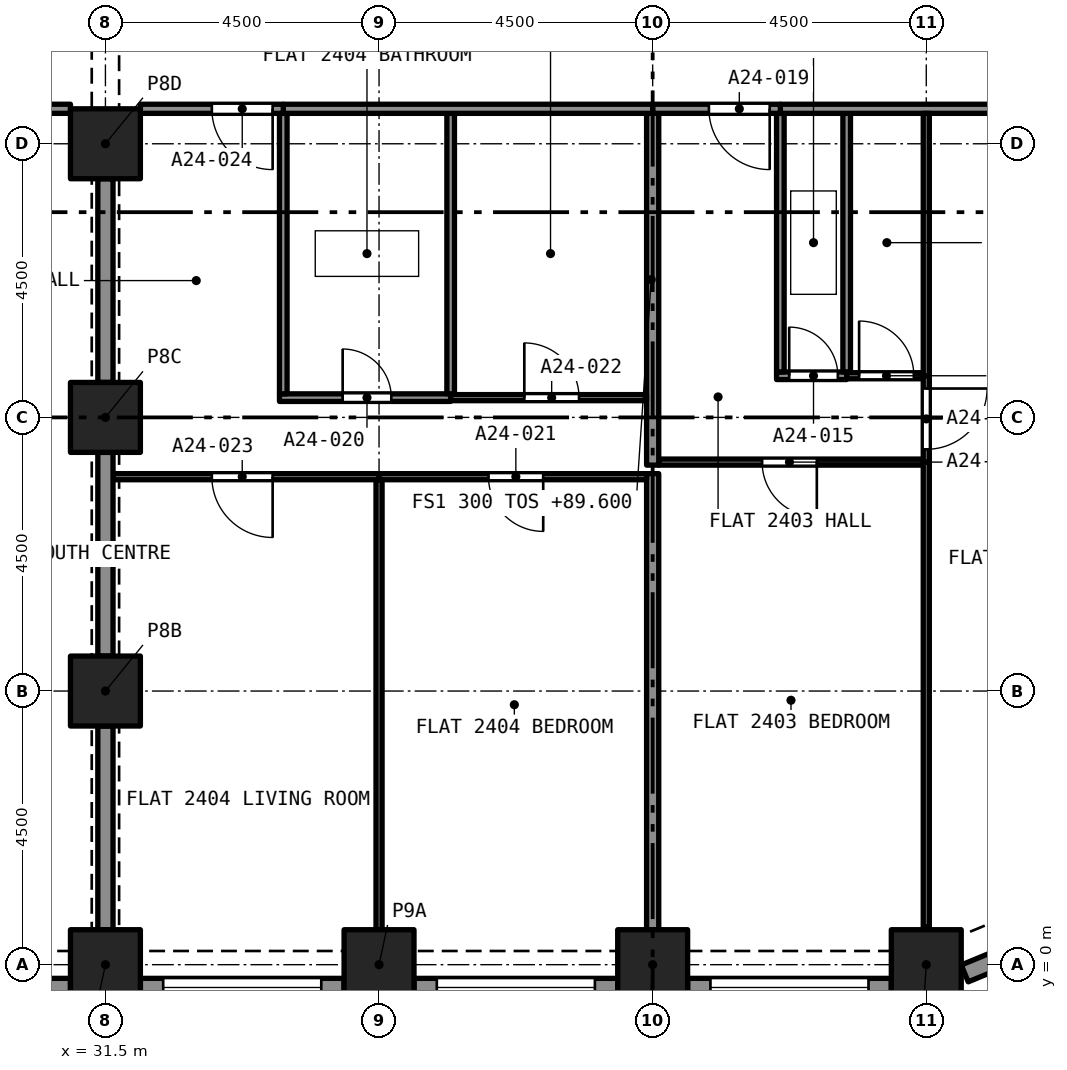
"""IFC4 building model, lengths in metres.
Left out: names, types, materials, properties, quantities, classifications, styles, units other than length and angle.
Written with IfcOpenShell. Run it as: python <this file> out.ifc"""

import sys

from ifc_helpers import new_model, si_unit, direction, frame, frame_2d, origin, origin_2d, place, context, subcontext, project, spatial, rectangle, extrude, element, fill, save


model = new_model("IFC4")
c1 = context("Model", 3, precision=1e-05, world=origin(), true_north=direction((0.0, 1.0)))
c2 = subcontext(c1, "Body", "Model", "MODEL_VIEW")
j1 = project(units=[si_unit("LENGTHUNIT", "METRE"), si_unit("PLANEANGLEUNIT", "RADIAN")], contexts=[c1])
p1 = place(None, origin())
s1 = spatial("IfcSite", under=j1, at=p1, CompositionType="ELEMENT")
p2 = place(p1, origin())
s2 = spatial("IfcBuilding", under=s1, at=p2, CompositionType="ELEMENT")
p3 = place(p2, frame((0.0, 0.0, 89.6)))
s3 = spatial("IfcBuildingStorey", under=s2, at=p3, CompositionType="ELEMENT", Elevation=89.6)
for number, where, z_axis, x_axis in (
    (1, (31.5, 0.0, 0.0), (0.0, 0.0, 1.0), (1.0, 0.0, 0.0)),
    (2, (36.0, 0.0, 0.0), (0.0, 0.0, 1.0), (1.0, 0.0, 0.0)),
    (3, (40.5, 0.0, 0.0), (0.0, 0.0, 1.0), (1.0, 0.0, 0.0)),
    (4, (45.0, 0.0, 0.0), (0.0, 0.0, 1.0), (1.0, 0.0, 0.0)),
    (5, (31.5, 4.5, 0.0), (0.0, 0.0, 1.0), (1.0, 0.0, 0.0)),
    (6, (31.5, 9.0, 0.0), (0.0, 0.0, 1.0), (1.0, 0.0, 0.0)),
    (7, (31.5, 13.5, 0.0), (0.0, 0.0, 1.0), (1.0, 0.0, 0.0)),
):
    element("IfcColumn", number, at=place(p3, frame(where, z_axis=z_axis, x_axis=x_axis)), inside=s3, PredefinedType="COLUMN", context=c2, shape_type="SweptSolid", body=[
        extrude(rectangle(XDim=1.15, YDim=1.15, at=origin_2d()), origin(), (0.0, 0.0, 1.0), 3.2),
    ])
p4 = place(p3, frame((30.925, -0.375, 0.0), z_axis=(0.0, 0.0, 1.0), x_axis=(-1.0, 0.0, 0.0)))
e8 = element("IfcWall", 8, at=p4, inside=s3, PredefinedType="SOLIDWALL", context=c2, shape_type="SweptSolid", body=[
    extrude(rectangle(XDim=3.35, YDim=0.3, at=frame_2d((1.675, 0.0))), origin(), (0.0, 0.0, 1.0), 3.2),
])
p5 = place(p4, frame((0.375, 0.0, 0.45)))
e9 = element("IfcOpeningElement", 9, at=p5, cuts=e8, PredefinedType="OPENING", context=c2, shape_type="SweptSolid", body=[
    extrude(rectangle(XDim=2.6, YDim=1.95, at=frame_2d((1.3, 0.975))), frame((0.0, 0.16, 0.0), z_axis=(0.0, -1.0, 0.0), x_axis=(1.0, 0.0, 0.0)), (0.0, 0.0, 1.0), 0.32),
])
p6 = place(p3, frame((35.425, -0.375, 0.0), z_axis=(0.0, 0.0, 1.0), x_axis=(-1.0, 0.0, 0.0)))
e10 = element("IfcWall", 10, at=p6, inside=s3, PredefinedType="SOLIDWALL", context=c2, shape_type="SweptSolid", body=[
    extrude(rectangle(XDim=3.35, YDim=0.3, at=frame_2d((1.675, 0.0))), origin(), (0.0, 0.0, 1.0), 3.2),
])
p7 = place(p6, frame((0.375, 0.0, 0.45)))
e11 = element("IfcOpeningElement", 11, at=p7, cuts=e10, PredefinedType="OPENING", context=c2, shape_type="SweptSolid", body=[
    extrude(rectangle(XDim=2.6, YDim=1.95, at=frame_2d((1.3, 0.975))), frame((0.0, 0.16, 0.0), z_axis=(0.0, -1.0, 0.0), x_axis=(1.0, 0.0, 0.0)), (0.0, 0.0, 1.0), 0.32),
])
p8 = place(p3, frame((39.925, -0.375, 0.0), z_axis=(0.0, 0.0, 1.0), x_axis=(-1.0, 0.0, 0.0)))
e12 = element("IfcWall", 12, at=p8, inside=s3, PredefinedType="SOLIDWALL", context=c2, shape_type="SweptSolid", body=[
    extrude(rectangle(XDim=3.35, YDim=0.3, at=frame_2d((1.675, 0.0))), origin(), (0.0, 0.0, 1.0), 3.2),
])
p9 = place(p8, frame((0.375, 0.0, 0.45)))
e13 = element("IfcOpeningElement", 13, at=p9, cuts=e12, PredefinedType="OPENING", context=c2, shape_type="SweptSolid", body=[
    extrude(rectangle(XDim=2.6, YDim=1.95, at=frame_2d((1.3, 0.975))), frame((0.0, 0.16, 0.0), z_axis=(0.0, -1.0, 0.0), x_axis=(1.0, 0.0, 0.0)), (0.0, 0.0, 1.0), 0.32),
])
p10 = place(p3, frame((44.425, -0.375, 0.0), z_axis=(0.0, 0.0, 1.0), x_axis=(-1.0, 0.0, 0.0)))
e14 = element("IfcWall", 14, at=p10, inside=s3, PredefinedType="SOLIDWALL", context=c2, shape_type="SweptSolid", body=[
    extrude(rectangle(XDim=3.35, YDim=0.3, at=frame_2d((1.675, 0.0))), origin(), (0.0, 0.0, 1.0), 3.2),
])
p11 = place(p10, frame((0.375, 0.0, 0.45)))
e15 = element("IfcOpeningElement", 15, at=p11, cuts=e14, PredefinedType="OPENING", context=c2, shape_type="SweptSolid", body=[
    extrude(rectangle(XDim=2.6, YDim=1.95, at=frame_2d((1.3, 0.975))), frame((0.0, 0.16, 0.0), z_axis=(0.0, -1.0, 0.0), x_axis=(1.0, 0.0, 0.0)), (0.0, 0.0, 1.0), 0.32),
])
p12 = place(p3, frame((47.631, 0.684, 0.0), z_axis=(0.0, 0.0, 1.0), x_axis=(-0.923862802911, -0.382723818695, 0.0)))
e16 = element("IfcWall", 16, at=p12, inside=s3, PredefinedType="SOLIDWALL", context=c2, shape_type="SweptSolid", body=[
    extrude(rectangle(XDim=2.164, YDim=0.3, at=frame_2d((1.082, 0.0))), origin(), (0.0, 0.0, 1.0), 3.2),
])
p13 = place(p12, frame((0.271, 0.0, 0.45)))
e17 = element("IfcOpeningElement", 17, at=p13, cuts=e16, PredefinedType="OPENING", context=c2, shape_type="SweptSolid", body=[
    extrude(rectangle(XDim=1.4, YDim=1.95, at=frame_2d((0.7, 0.975))), frame((0.0, 0.16, 0.0), z_axis=(0.0, -1.0, 0.0), x_axis=(1.0, 0.0, 0.0)), (0.0, 0.0, 1.0), 0.32),
])
p14 = place(p3, frame((42.538, 9.685, 0.0), z_axis=(0.0, 0.0, 1.0), x_axis=(1.0, 0.0, 0.0)))
e18 = element("IfcWall", 18, at=p14, inside=s3, PredefinedType="PARTITIONING", context=c2, shape_type="SweptSolid", body=[
    extrude(rectangle(XDim=1.153, YDim=0.125, at=frame_2d((0.577, 0.0))), origin(), (0.0, 0.0, 1.0), 2.9),
])
p15 = place(p14, frame((0.208, 0.0, 0.0)))
e19 = element("IfcOpeningElement", 19, at=p15, cuts=e18, PredefinedType="OPENING", context=c2, shape_type="SweptSolid", body=[
    extrude(rectangle(XDim=0.8, YDim=2.1, at=frame_2d((0.4, 1.05))), frame((0.0, 0.073, 0.0), z_axis=(0.0, -1.0, 0.0), x_axis=(1.0, 0.0, 0.0)), (0.0, 0.0, 1.0), 0.145),
])
for number, where, z_axis, x_axis in (
    (20, (42.6, 9.748, 0.0), (0.0, 0.0, 1.0), (0.0, 1.0, 0.0)),
    (21, (43.691, 9.748, 0.0), (0.0, 0.0, 1.0), (0.0, 1.0, 0.0)),
):
    element("IfcWall", number, at=place(p3, frame(where, z_axis=z_axis, x_axis=x_axis)), inside=s3, PredefinedType="PARTITIONING", context=c2, shape_type="SweptSolid", body=[
        extrude(rectangle(XDim=4.252, YDim=0.125, at=frame_2d((2.126, 0.0))), origin(), (0.0, 0.0, 1.0), 2.9),
    ])
p16 = place(p3, frame((42.6, 14.075, 0.0), z_axis=(0.0, 0.0, 1.0), x_axis=(1.0, 0.0, 0.0)))
e22 = element("IfcWall", 22, at=p16, inside=s3, PredefinedType="PARTITIONING", context=c2, shape_type="SweptSolid", body=[
    extrude(rectangle(XDim=6.325, YDim=0.15, at=frame_2d((3.163, 0.0))), origin(), (0.0, 0.0, 1.0), 2.9),
])
p17 = place(p3, frame((44.95, 8.265, 0.0), z_axis=(0.0, 0.0, 1.0), x_axis=(-1.0, 0.0, 0.0)))
e23 = element("IfcWall", 23, at=p17, inside=s3, PredefinedType="PARTITIONING", context=c2, shape_type="SweptSolid", body=[
    extrude(rectangle(XDim=4.35, YDim=0.1, at=frame_2d((2.175, 0.0))), origin(), (0.0, 0.0, 1.0), 2.9),
])
p18 = place(p17, frame((1.75, 0.0, 0.0)))
e24 = element("IfcOpeningElement", 24, at=p18, cuts=e23, PredefinedType="OPENING", context=c2, shape_type="SweptSolid", body=[
    extrude(rectangle(XDim=0.9, YDim=2.1, at=frame_2d((0.45, 1.05))), frame((0.0, 0.06, 0.0), z_axis=(0.0, -1.0, 0.0), x_axis=(1.0, 0.0, 0.0)), (0.0, 0.0, 1.0), 0.12),
])
p19 = place(p3, frame((45.0, 0.622, 0.0), z_axis=(0.0, 0.0, 1.0), x_axis=(0.0, 1.0, 0.0)))
e25 = element("IfcWall", 25, at=p19, inside=s3, PredefinedType="PARTITIONING", context=c2, shape_type="SweptSolid", body=[
    extrude(rectangle(XDim=7.643, YDim=0.1, at=frame_2d((3.821, 0.0))), origin(), (0.0, 0.0, 1.0), 2.9),
])
p20 = place(p3, frame((40.5, 0.575, 0.0), z_axis=(0.0, 0.0, 1.0), x_axis=(0.0, 1.0, 0.0)))
e26 = element("IfcWall", 26, at=p20, inside=s3, PredefinedType="PARTITIONING", context=c2, shape_type="SweptSolid", body=[
    extrude(rectangle(XDim=7.5, YDim=0.2, at=frame_2d((3.75, 0.0))), origin(), (0.0, 0.0, 1.0), 2.9),
])
p21 = place(p3, frame((43.691, 9.685, 0.0), z_axis=(0.0, 0.0, 1.0), x_axis=(1.0, 0.0, 0.0)))
e27 = element("IfcWall", 27, at=p21, inside=s3, PredefinedType="PARTITIONING", context=c2, shape_type="SweptSolid", body=[
    extrude(rectangle(XDim=1.259, YDim=0.1, at=frame_2d((0.629, 0.0))), origin(), (0.0, 0.0, 1.0), 2.9),
])
p22 = place(p21, frame((0.205, 0.0, 0.0)))
e28 = element("IfcOpeningElement", 28, at=p22, cuts=e27, PredefinedType="OPENING", context=c2, shape_type="SweptSolid", body=[
    extrude(rectangle(XDim=0.9, YDim=2.1, at=frame_2d((0.45, 1.05))), frame((0.0, 0.06, 0.0), z_axis=(0.0, -1.0, 0.0), x_axis=(1.0, 0.0, 0.0)), (0.0, 0.0, 1.0), 0.12),
])
p23 = place(p3, frame((45.0, 9.685, 0.0), z_axis=(0.0, 0.0, 1.0), x_axis=(0.0, -1.0, 0.0)))
e29 = element("IfcWall", 29, at=p23, inside=s3, PredefinedType="PARTITIONING", context=c2, shape_type="SweptSolid", body=[
    extrude(rectangle(XDim=1.42, YDim=0.1, at=frame_2d((0.71, 0.0))), origin(), (0.0, 0.0, 1.0), 2.9),
])
p24 = place(p23, frame((0.21, 0.0, 0.0)))
e30 = element("IfcOpeningElement", 30, at=p24, cuts=e29, PredefinedType="OPENING", context=c2, shape_type="SweptSolid", body=[
    extrude(rectangle(XDim=1.0, YDim=2.1, at=frame_2d((0.5, 1.05))), frame((0.0, 0.06, 0.0), z_axis=(0.0, -1.0, 0.0), x_axis=(1.0, 0.0, 0.0)), (0.0, 0.0, 1.0), 0.12),
])
p25 = place(p3, frame((40.5, 8.215, 0.0), z_axis=(0.0, 0.0, 1.0), x_axis=(0.0, 1.0, 0.0)))
e31 = element("IfcWall", 31, at=p25, inside=s3, PredefinedType="PARTITIONING", context=c2, shape_type="SweptSolid", body=[
    extrude(rectangle(XDim=5.785, YDim=0.2, at=frame_2d((2.893, 0.0))), origin(), (0.0, 0.0, 1.0), 2.9),
])
p26 = place(p3, frame((42.6, 14.075, 0.0), z_axis=(0.0, 0.0, 1.0), x_axis=(-1.0, 0.0, 0.0)))
e32 = element("IfcWall", 32, at=p26, inside=s3, PredefinedType="PARTITIONING", context=c2, shape_type="SweptSolid", body=[
    extrude(rectangle(XDim=2.1, YDim=0.15, at=frame_2d((1.05, 0.0))), origin(), (0.0, 0.0, 1.0), 2.9),
])
p27 = place(p26, frame((0.175, 0.0, 0.0)))
e33 = element("IfcOpeningElement", 33, at=p27, cuts=e32, PredefinedType="OPENING", context=c2, shape_type="SweptSolid", body=[
    extrude(rectangle(XDim=1.0, YDim=2.1, at=frame_2d((0.5, 1.05))), frame((0.0, 0.085, 0.0), z_axis=(0.0, -1.0, 0.0), x_axis=(1.0, 0.0, 0.0)), (0.0, 0.0, 1.0), 0.17),
])
p28 = place(p3, frame((45.0, 9.685, 0.0), z_axis=(0.0, 0.0, 1.0), x_axis=(0.0, 1.0, 0.0)))
e34 = element("IfcWall", 34, at=p28, inside=s3, PredefinedType="PARTITIONING", context=c2, shape_type="SweptSolid", body=[
    extrude(rectangle(XDim=4.315, YDim=0.1, at=frame_2d((2.157, 0.0))), origin(), (0.0, 0.0, 1.0), 2.9),
])
p29 = place(p3, frame((34.363, 9.325, 0.0), z_axis=(0.0, 0.0, 1.0), x_axis=(1.0, 0.0, 0.0)))
e35 = element("IfcWall", 35, at=p29, inside=s3, PredefinedType="PARTITIONING", context=c2, shape_type="SweptSolid", body=[
    extrude(rectangle(XDim=2.816, YDim=0.125, at=frame_2d((1.408, 0.0))), origin(), (0.0, 0.0, 1.0), 2.9),
])
p30 = place(p29, frame((1.039, 0.0, 0.0)))
e36 = element("IfcOpeningElement", 36, at=p30, cuts=e35, PredefinedType="OPENING", context=c2, shape_type="SweptSolid", body=[
    extrude(rectangle(XDim=0.8, YDim=2.1, at=frame_2d((0.4, 1.05))), frame((0.0, 0.073, 0.0), z_axis=(0.0, -1.0, 0.0), x_axis=(1.0, 0.0, 0.0)), (0.0, 0.0, 1.0), 0.145),
])
for number, where, z_axis, x_axis in (
    (37, (34.425, 9.387, 0.0), (0.0, 0.0, 1.0), (0.0, 1.0, 0.0)),
    (38, (37.178, 9.387, 0.0), (0.0, 0.0, 1.0), (0.0, 1.0, 0.0)),
):
    element("IfcWall", number, at=place(p3, frame(where, z_axis=z_axis, x_axis=x_axis)), inside=s3, PredefinedType="PARTITIONING", context=c2, shape_type="SweptSolid", body=[
        extrude(rectangle(XDim=4.613, YDim=0.125, at=frame_2d((2.306, 0.0))), origin(), (0.0, 0.0, 1.0), 2.9),
    ])
p31 = place(p3, frame((34.425, 14.075, 0.0), z_axis=(0.0, 0.0, 1.0), x_axis=(1.0, 0.0, 0.0)))
e39 = element("IfcWall", 39, at=p31, inside=s3, PredefinedType="PARTITIONING", context=c2, shape_type="SweptSolid", body=[
    extrude(rectangle(XDim=6.075, YDim=0.15, at=frame_2d((3.038, 0.0))), origin(), (0.0, 0.0, 1.0), 2.9),
])
p32 = place(p3, frame((40.4, 8.025, 0.0), z_axis=(0.0, 0.0, 1.0), x_axis=(-1.0, 0.0, 0.0)))
e40 = element("IfcWall", 40, at=p32, inside=s3, PredefinedType="PARTITIONING", context=c2, shape_type="SweptSolid", body=[
    extrude(rectangle(XDim=4.4, YDim=0.1, at=frame_2d((2.2, 0.0))), origin(), (0.0, 0.0, 1.0), 2.9),
])
p33 = place(p32, frame((1.7, 0.0, 0.0)))
e41 = element("IfcOpeningElement", 41, at=p33, cuts=e40, PredefinedType="OPENING", context=c2, shape_type="SweptSolid", body=[
    extrude(rectangle(XDim=0.9, YDim=2.1, at=frame_2d((0.45, 1.05))), frame((0.0, 0.06, 0.0), z_axis=(0.0, -1.0, 0.0), x_axis=(1.0, 0.0, 0.0)), (0.0, 0.0, 1.0), 0.12),
])
p34 = place(p3, frame((36.0, 0.575, 0.0), z_axis=(0.0, 0.0, 1.0), x_axis=(0.0, 1.0, 0.0)))
e42 = element("IfcWall", 42, at=p34, inside=s3, PredefinedType="PARTITIONING", context=c2, shape_type="SweptSolid", body=[
    extrude(rectangle(XDim=7.4, YDim=0.1, at=frame_2d((3.7, 0.0))), origin(), (0.0, 0.0, 1.0), 2.9),
])
p35 = place(p3, frame((37.178, 9.325, 0.0), z_axis=(0.0, 0.0, 1.0), x_axis=(1.0, 0.0, 0.0)))
e43 = element("IfcWall", 43, at=p35, inside=s3, PredefinedType="PARTITIONING", context=c2, shape_type="SweptSolid", body=[
    extrude(rectangle(XDim=3.222, YDim=0.1, at=frame_2d((1.611, 0.0))), origin(), (0.0, 0.0, 1.0), 2.9),
])
p36 = place(p35, frame((1.211, 0.0, 0.0)))
e44 = element("IfcOpeningElement", 44, at=p36, cuts=e43, PredefinedType="OPENING", context=c2, shape_type="SweptSolid", body=[
    extrude(rectangle(XDim=0.9, YDim=2.1, at=frame_2d((0.45, 1.05))), frame((0.0, 0.06, 0.0), z_axis=(0.0, -1.0, 0.0), x_axis=(1.0, 0.0, 0.0)), (0.0, 0.0, 1.0), 0.12),
])
p37 = place(p3, frame((36.0, 8.025, 0.0), z_axis=(0.0, 0.0, 1.0), x_axis=(-1.0, 0.0, 0.0)))
e45 = element("IfcWall", 45, at=p37, inside=s3, PredefinedType="PARTITIONING", context=c2, shape_type="SweptSolid", body=[
    extrude(rectangle(XDim=4.375, YDim=0.1, at=frame_2d((2.188, 0.0))), origin(), (0.0, 0.0, 1.0), 2.9),
])
p38 = place(p37, frame((1.75, 0.0, 0.0)))
e46 = element("IfcOpeningElement", 46, at=p38, cuts=e45, PredefinedType="OPENING", context=c2, shape_type="SweptSolid", body=[
    extrude(rectangle(XDim=1.0, YDim=2.1, at=frame_2d((0.5, 1.05))), frame((0.0, 0.06, 0.0), z_axis=(0.0, -1.0, 0.0), x_axis=(1.0, 0.0, 0.0)), (0.0, 0.0, 1.0), 0.12),
])
p39 = place(p3, frame((31.5, 9.575, 0.0), z_axis=(0.0, 0.0, 1.0), x_axis=(0.0, 1.0, 0.0)))
e47 = element("IfcWall", 47, at=p39, inside=s3, PredefinedType="PARTITIONING", context=c2, shape_type="SweptSolid", body=[
    extrude(rectangle(XDim=3.35, YDim=0.25, at=frame_2d((1.675, 0.0))), origin(), (0.0, 0.0, 1.0), 2.38),
])
p40 = place(p3, frame((34.425, 14.075, 0.0), z_axis=(0.0, 0.0, 1.0), x_axis=(-1.0, 0.0, 0.0)))
e48 = element("IfcWall", 48, at=p40, inside=s3, PredefinedType="PARTITIONING", context=c2, shape_type="SweptSolid", body=[
    extrude(rectangle(XDim=2.35, YDim=0.15, at=frame_2d((1.175, 0.0))), origin(), (0.0, 0.0, 1.0), 2.9),
])
p41 = place(p40, frame((0.175, 0.0, 0.0)))
e49 = element("IfcOpeningElement", 49, at=p41, cuts=e48, PredefinedType="OPENING", context=c2, shape_type="SweptSolid", body=[
    extrude(rectangle(XDim=1.0, YDim=2.1, at=frame_2d((0.5, 1.05))), frame((0.0, 0.085, 0.0), z_axis=(0.0, -1.0, 0.0), x_axis=(1.0, 0.0, 0.0)), (0.0, 0.0, 1.0), 0.17),
])
for number, where, z_axis, x_axis in (
    (50, (31.5, 0.575, 0.0), (0.0, 0.0, 1.0), (0.0, 1.0, 0.0)),
    (51, (31.5, 5.075, 0.0), (0.0, 0.0, 1.0), (0.0, 1.0, 0.0)),
):
    element("IfcWall", number, at=place(p3, frame(where, z_axis=z_axis, x_axis=x_axis)), inside=s3, PredefinedType="PARTITIONING", context=c2, shape_type="SweptSolid", body=[
        extrude(rectangle(XDim=3.35, YDim=0.25, at=frame_2d((1.675, 0.0))), origin(), (0.0, 0.0, 1.0), 2.38),
    ])
p42 = place(p3, frame((30.925, 14.075, 0.0), z_axis=(0.0, 0.0, 1.0), x_axis=(-1.0, 0.0, 0.0)))
e52 = element("IfcWall", 52, at=p42, inside=s3, PredefinedType="PARTITIONING", context=c2, shape_type="SweptSolid", body=[
    extrude(rectangle(XDim=3.925, YDim=0.15, at=frame_2d((1.962, 0.0))), origin(), (0.0, 0.0, 1.0), 2.75),
])
p43 = place(p42, frame((1.175, 0.0, 0.0)))
e53 = element("IfcOpeningElement", 53, at=p43, cuts=e52, PredefinedType="OPENING", context=c2, shape_type="SweptSolid", body=[
    extrude(rectangle(XDim=1.0, YDim=2.1, at=frame_2d((0.5, 1.05))), frame((0.0, 0.085, 0.0), z_axis=(0.0, -1.0, 0.0), x_axis=(1.0, 0.0, 0.0)), (0.0, 0.0, 1.0), 0.17),
])
p44 = place(p7, origin())
e54 = element("IfcWindow", 54, at=p44, inside=s3, PartitioningType="SINGLE_PANEL", PredefinedType="WINDOW", context=c2, shape_type="SweptSolid", body=[
    extrude(rectangle(XDim=2.6, YDim=1.95, at=frame_2d((1.3, 0.975))), frame((0.0, 0.03, 0.0), z_axis=(0.0, -1.0, 0.0), x_axis=(1.0, 0.0, 0.0)), (0.0, 0.0, 1.0), 0.06),
])
fill(e11, e54)
p45 = place(p9, origin())
e55 = element("IfcWindow", 55, at=p45, inside=s3, PartitioningType="SINGLE_PANEL", PredefinedType="WINDOW", context=c2, shape_type="SweptSolid", body=[
    extrude(rectangle(XDim=2.6, YDim=1.95, at=frame_2d((1.3, 0.975))), frame((0.0, 0.03, 0.0), z_axis=(0.0, -1.0, 0.0), x_axis=(1.0, 0.0, 0.0)), (0.0, 0.0, 1.0), 0.06),
])
fill(e13, e55)
p46 = place(p11, origin())
e56 = element("IfcWindow", 56, at=p46, inside=s3, PartitioningType="SINGLE_PANEL", PredefinedType="WINDOW", context=c2, shape_type="SweptSolid", body=[
    extrude(rectangle(XDim=2.6, YDim=1.95, at=frame_2d((1.3, 0.975))), frame((0.0, 0.03, 0.0), z_axis=(0.0, -1.0, 0.0), x_axis=(1.0, 0.0, 0.0)), (0.0, 0.0, 1.0), 0.06),
])
fill(e15, e56)
p47 = place(p15, origin())
e57 = element("IfcDoor", 57, at=p47, inside=s3, OperationType="SINGLE_SWING_RIGHT", PredefinedType="DOOR", context=c2, shape_type="SweptSolid", body=[
    extrude(rectangle(XDim=0.8, YDim=2.1, at=frame_2d((0.4, 1.05))), frame((0.0, 0.025, 0.0), z_axis=(0.0, -1.0, 0.0), x_axis=(1.0, 0.0, 0.0)), (0.0, 0.0, 1.0), 0.05),
])
fill(e19, e57)
p48 = place(p18, origin())
e58 = element("IfcDoor", 58, at=p48, inside=s3, OperationType="SINGLE_SWING_RIGHT", PredefinedType="DOOR", context=c2, shape_type="SweptSolid", body=[
    extrude(rectangle(XDim=0.9, YDim=2.1, at=frame_2d((0.45, 1.05))), frame((0.0, 0.025, 0.0), z_axis=(0.0, -1.0, 0.0), x_axis=(1.0, 0.0, 0.0)), (0.0, 0.0, 1.0), 0.05),
])
fill(e24, e58)
p49 = place(p22, origin())
e59 = element("IfcDoor", 59, at=p49, inside=s3, OperationType="SINGLE_SWING_RIGHT", PredefinedType="DOOR", context=c2, shape_type="SweptSolid", body=[
    extrude(rectangle(XDim=0.9, YDim=2.1, at=frame_2d((0.45, 1.05))), frame((0.0, 0.025, 0.0), z_axis=(0.0, -1.0, 0.0), x_axis=(1.0, 0.0, 0.0)), (0.0, 0.0, 1.0), 0.05),
])
fill(e28, e59)
p50 = place(p24, origin())
e60 = element("IfcDoor", 60, at=p50, inside=s3, OperationType="SINGLE_SWING_RIGHT", PredefinedType="DOOR", context=c2, shape_type="SweptSolid", body=[
    extrude(rectangle(XDim=1.0, YDim=2.1, at=frame_2d((0.5, 1.05))), frame((0.0, 0.025, 0.0), z_axis=(0.0, -1.0, 0.0), x_axis=(1.0, 0.0, 0.0)), (0.0, 0.0, 1.0), 0.05),
])
fill(e30, e60)
p51 = place(p27, origin())
e61 = element("IfcDoor", 61, at=p51, inside=s3, OperationType="SINGLE_SWING_LEFT", PredefinedType="DOOR", context=c2, shape_type="SweptSolid", body=[
    extrude(rectangle(XDim=1.0, YDim=2.1, at=frame_2d((0.5, 1.05))), frame((0.0, 0.025, 0.0), z_axis=(0.0, -1.0, 0.0), x_axis=(1.0, 0.0, 0.0)), (0.0, 0.0, 1.0), 0.05),
])
fill(e33, e61)
p52 = place(p30, origin())
e62 = element("IfcDoor", 62, at=p52, inside=s3, OperationType="SINGLE_SWING_RIGHT", PredefinedType="DOOR", context=c2, shape_type="SweptSolid", body=[
    extrude(rectangle(XDim=0.8, YDim=2.1, at=frame_2d((0.4, 1.05))), frame((0.0, 0.025, 0.0), z_axis=(0.0, -1.0, 0.0), x_axis=(1.0, 0.0, 0.0)), (0.0, 0.0, 1.0), 0.05),
])
fill(e36, e62)
p53 = place(p33, origin())
e63 = element("IfcDoor", 63, at=p53, inside=s3, OperationType="SINGLE_SWING_LEFT", PredefinedType="DOOR", context=c2, shape_type="SweptSolid", body=[
    extrude(rectangle(XDim=0.9, YDim=2.1, at=frame_2d((0.45, 1.05))), frame((0.0, 0.025, 0.0), z_axis=(0.0, -1.0, 0.0), x_axis=(1.0, 0.0, 0.0)), (0.0, 0.0, 1.0), 0.05),
])
fill(e41, e63)
p54 = place(p36, origin())
e64 = element("IfcDoor", 64, at=p54, inside=s3, OperationType="SINGLE_SWING_RIGHT", PredefinedType="DOOR", context=c2, shape_type="SweptSolid", body=[
    extrude(rectangle(XDim=0.9, YDim=2.1, at=frame_2d((0.45, 1.05))), frame((0.0, 0.025, 0.0), z_axis=(0.0, -1.0, 0.0), x_axis=(1.0, 0.0, 0.0)), (0.0, 0.0, 1.0), 0.05),
])
fill(e44, e64)
p55 = place(p38, origin())
e65 = element("IfcDoor", 65, at=p55, inside=s3, OperationType="SINGLE_SWING_RIGHT", PredefinedType="DOOR", context=c2, shape_type="SweptSolid", body=[
    extrude(rectangle(XDim=1.0, YDim=2.1, at=frame_2d((0.5, 1.05))), frame((0.0, 0.025, 0.0), z_axis=(0.0, -1.0, 0.0), x_axis=(1.0, 0.0, 0.0)), (0.0, 0.0, 1.0), 0.05),
])
fill(e46, e65)
p56 = place(p41, origin())
e66 = element("IfcDoor", 66, at=p56, inside=s3, OperationType="SINGLE_SWING_LEFT", PredefinedType="DOOR", context=c2, shape_type="SweptSolid", body=[
    extrude(rectangle(XDim=1.0, YDim=2.1, at=frame_2d((0.5, 1.05))), frame((0.0, 0.025, 0.0), z_axis=(0.0, -1.0, 0.0), x_axis=(1.0, 0.0, 0.0)), (0.0, 0.0, 1.0), 0.05),
])
fill(e49, e66)
save(model, sys.argv[1])
